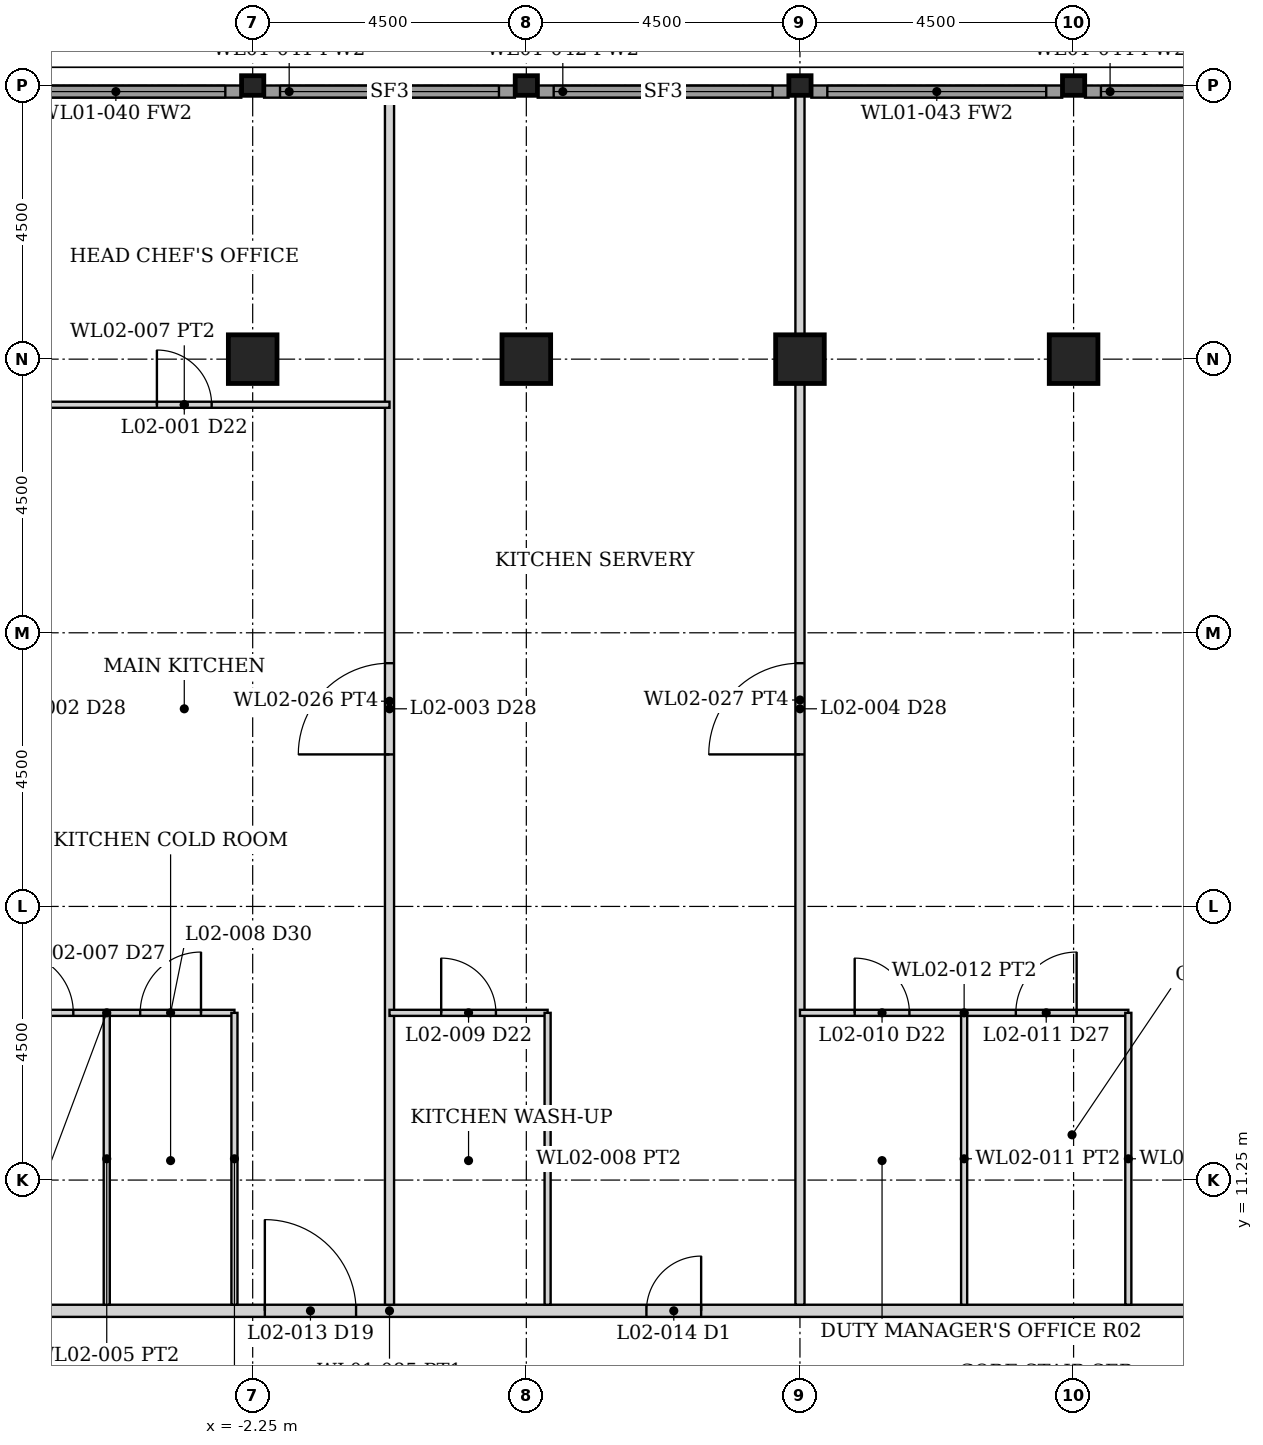
"""IFC4 building model, lengths in metres.
Left out: names, types, materials, properties, quantities, classifications, styles, units other than length and angle.
Written with IfcOpenShell. Run it as: python <this file> out.ifc"""

import sys

from ifc_helpers import new_model, si_unit, direction, frame, frame_2d, origin, origin_2d, place, context, subcontext, project, spatial, rectangle, hollow_rectangle, i_section, extrude, element, fill, save


model = new_model("IFC4")
c1 = context("Model", 3, precision=1e-05, world=origin(), true_north=direction((0.0, 1.0)))
c2 = subcontext(c1, "Body", "Model", "MODEL_VIEW")
j1 = project(units=[si_unit("LENGTHUNIT", "METRE"), si_unit("PLANEANGLEUNIT", "RADIAN")], contexts=[c1])
p1 = place(None, origin())
s1 = spatial("IfcSite", under=j1, at=p1, CompositionType="ELEMENT")
p2 = place(p1, origin())
s2 = spatial("IfcBuilding", under=s1, at=p2, CompositionType="ELEMENT")
p3 = place(p2, frame((0.0, 0.0, 11.0)))
s3 = spatial("IfcBuildingStorey", under=s2, at=p3, CompositionType="ELEMENT", Elevation=11.0)
for number, where, z_axis, x_axis in (
    (1, (-2.25, 24.75, 0.0), (0.0, 0.0, 1.0), (0.0, 1.0, 0.0)),
    (2, (2.25, 24.75, 0.0), (0.0, 0.0, 1.0), (0.0, 1.0, 0.0)),
    (3, (6.75, 24.75, 0.0), (0.0, 0.0, 1.0), (0.0, 1.0, 0.0)),
    (4, (11.25, 24.75, 0.0), (0.0, 0.0, 1.0), (0.0, 1.0, 0.0)),
):
    element("IfcColumn", number, at=place(p3, frame(where, z_axis=z_axis, x_axis=x_axis)), inside=s3, PredefinedType="COLUMN", context=c2, shape_type="SweptSolid", body=[
        extrude(hollow_rectangle(XDim=0.8, YDim=0.8, WallThickness=0.08, at=origin_2d()), origin(), (0.0, 0.0, 1.0), 5.0),
    ])
for number, where, z_axis, x_axis in (
    (5, (-2.25, 29.25, 0.0), (0.0, 0.0, 1.0), (0.0, 1.0, 0.0)),
    (6, (2.25, 29.25, 0.0), (0.0, 0.0, 1.0), (0.0, 1.0, 0.0)),
    (7, (6.75, 29.25, 0.0), (0.0, 0.0, 1.0), (0.0, 1.0, 0.0)),
    (8, (11.25, 29.25, 0.0), (0.0, 0.0, 1.0), (0.0, 1.0, 0.0)),
):
    element("IfcColumn", number, at=place(p3, frame(where, z_axis=z_axis, x_axis=x_axis)), inside=s3, PredefinedType="COLUMN", context=c2, shape_type="SweptSolid", body=[
        extrude(i_section(OverallWidth=0.322, OverallDepth=0.365, WebThickness=0.027, FlangeThickness=0.044, FilletRadius=0.015, at=origin_2d()), origin(), (0.0, 0.0, 1.0), 5.0),
    ])
p4 = place(p3, frame((-6.562, 29.15, 0.0), z_axis=(0.0, 0.0, 1.0), x_axis=(1.0, 0.0, 0.0)))
e9 = element("IfcWall", 9, at=p4, inside=s3, PredefinedType="SOLIDWALL", context=c2, shape_type="SweptSolid", body=[
    extrude(rectangle(XDim=4.125, YDim=0.2, at=frame_2d((2.062, 0.0))), origin(), (0.0, 0.0, 1.0), 4.133),
])
p5 = place(p4, frame((0.262, 0.0, 0.15)))
e10 = element("IfcOpeningElement", 10, at=p5, cuts=e9, PredefinedType="OPENING", context=c2, shape_type="SweptSolid", body=[
    extrude(rectangle(XDim=3.6, YDim=3.833, at=frame_2d((1.8, 1.917))), frame((0.0, 0.11, 0.0), z_axis=(0.0, -1.0, 0.0), x_axis=(1.0, 0.0, 0.0)), (0.0, 0.0, 1.0), 0.22),
])
p6 = place(p3, frame((-2.062, 29.15, 0.0), z_axis=(0.0, 0.0, 1.0), x_axis=(1.0, 0.0, 0.0)))
e11 = element("IfcWall", 11, at=p6, inside=s3, PredefinedType="SOLIDWALL", context=c2, shape_type="SweptSolid", body=[
    extrude(rectangle(XDim=4.125, YDim=0.2, at=frame_2d((2.062, 0.0))), origin(), (0.0, 0.0, 1.0), 4.133),
])
p7 = place(p6, frame((0.262, 0.0, 0.15)))
e12 = element("IfcOpeningElement", 12, at=p7, cuts=e11, PredefinedType="OPENING", context=c2, shape_type="SweptSolid", body=[
    extrude(rectangle(XDim=3.6, YDim=3.833, at=frame_2d((1.8, 1.917))), frame((0.0, 0.11, 0.0), z_axis=(0.0, -1.0, 0.0), x_axis=(1.0, 0.0, 0.0)), (0.0, 0.0, 1.0), 0.22),
])
p8 = place(p3, frame((2.438, 29.15, 0.0), z_axis=(0.0, 0.0, 1.0), x_axis=(1.0, 0.0, 0.0)))
e13 = element("IfcWall", 13, at=p8, inside=s3, PredefinedType="SOLIDWALL", context=c2, shape_type="SweptSolid", body=[
    extrude(rectangle(XDim=4.125, YDim=0.2, at=frame_2d((2.062, 0.0))), origin(), (0.0, 0.0, 1.0), 4.133),
])
p9 = place(p8, frame((0.262, 0.0, 0.15)))
e14 = element("IfcOpeningElement", 14, at=p9, cuts=e13, PredefinedType="OPENING", context=c2, shape_type="SweptSolid", body=[
    extrude(rectangle(XDim=3.6, YDim=3.833, at=frame_2d((1.8, 1.917))), frame((0.0, 0.11, 0.0), z_axis=(0.0, -1.0, 0.0), x_axis=(1.0, 0.0, 0.0)), (0.0, 0.0, 1.0), 0.22),
])
p10 = place(p3, frame((6.938, 29.15, 0.0), z_axis=(0.0, 0.0, 1.0), x_axis=(1.0, 0.0, 0.0)))
e15 = element("IfcWall", 15, at=p10, inside=s3, PredefinedType="SOLIDWALL", context=c2, shape_type="SweptSolid", body=[
    extrude(rectangle(XDim=4.125, YDim=0.2, at=frame_2d((2.062, 0.0))), origin(), (0.0, 0.0, 1.0), 4.133),
])
p11 = place(p10, frame((0.262, 0.0, 0.15)))
e16 = element("IfcOpeningElement", 16, at=p11, cuts=e15, PredefinedType="OPENING", context=c2, shape_type="SweptSolid", body=[
    extrude(rectangle(XDim=3.6, YDim=3.833, at=frame_2d((1.8, 1.917))), frame((0.0, 0.11, 0.0), z_axis=(0.0, -1.0, 0.0), x_axis=(1.0, 0.0, 0.0)), (0.0, 0.0, 1.0), 0.22),
])
p12 = place(p3, frame((11.438, 29.15, 0.0), z_axis=(0.0, 0.0, 1.0), x_axis=(1.0, 0.0, 0.0)))
e17 = element("IfcWall", 17, at=p12, inside=s3, PredefinedType="SOLIDWALL", context=c2, shape_type="SweptSolid", body=[
    extrude(rectangle(XDim=4.125, YDim=0.2, at=frame_2d((2.062, 0.0))), origin(), (0.0, 0.0, 1.0), 4.133),
])
p13 = place(p12, frame((0.262, 0.0, 0.15)))
e18 = element("IfcOpeningElement", 18, at=p13, cuts=e17, PredefinedType="OPENING", context=c2, shape_type="SweptSolid", body=[
    extrude(rectangle(XDim=3.6, YDim=3.833, at=frame_2d((1.8, 1.917))), frame((0.0, 0.11, 0.0), z_axis=(0.0, -1.0, 0.0), x_axis=(1.0, 0.0, 0.0)), (0.0, 0.0, 1.0), 0.22),
])
p14 = place(p3, frame((-25.075, 9.1, 0.0), z_axis=(0.0, 0.0, 1.0), x_axis=(1.0, 0.0, 0.0)))
e19 = element("IfcWall", 19, at=p14, inside=s3, PredefinedType="PARTITIONING", context=c2, shape_type="SweptSolid", body=[
    extrude(rectangle(XDim=50.15, YDim=0.2, at=frame_2d((25.075, 0.0))), origin(), (0.0, 0.0, 1.0), 3.829),
])
p15 = place(p14, frame((6.4, 0.0, 0.0)))
e20 = element("IfcOpeningElement", 20, at=p15, cuts=e19, PredefinedType="OPENING", context=c2, shape_type="SweptSolid", body=[
    extrude(rectangle(XDim=1.8, YDim=2.1, at=frame_2d((0.9, 1.05))), frame((0.0, 0.11, 0.0), z_axis=(0.0, -1.0, 0.0), x_axis=(1.0, 0.0, 0.0)), (0.0, 0.0, 1.0), 0.22),
])
p16 = place(p14, frame((23.025, 0.0, 0.0)))
e21 = element("IfcOpeningElement", 21, at=p16, cuts=e19, PredefinedType="OPENING", context=c2, shape_type="SweptSolid", body=[
    extrude(rectangle(XDim=1.5, YDim=2.1, at=frame_2d((0.75, 1.05))), frame((0.0, 0.11, 0.0), z_axis=(0.0, -1.0, 0.0), x_axis=(1.0, 0.0, 0.0)), (0.0, 0.0, 1.0), 0.22),
])
p17 = place(p14, frame((29.3, 0.0, 0.0)))
e22 = element("IfcOpeningElement", 22, at=p17, cuts=e19, PredefinedType="OPENING", context=c2, shape_type="SweptSolid", body=[
    extrude(rectangle(XDim=0.9, YDim=2.1, at=frame_2d((0.45, 1.05))), frame((0.0, 0.11, 0.0), z_axis=(0.0, -1.0, 0.0), x_axis=(1.0, 0.0, 0.0)), (0.0, 0.0, 1.0), 0.22),
])
p18 = place(p14, frame((41.95, 0.0, 0.0)))
e23 = element("IfcOpeningElement", 23, at=p18, cuts=e19, PredefinedType="OPENING", context=c2, shape_type="SweptSolid", body=[
    extrude(rectangle(XDim=1.8, YDim=2.1, at=frame_2d((0.9, 1.05))), frame((0.0, 0.11, 0.0), z_axis=(0.0, -1.0, 0.0), x_axis=(1.0, 0.0, 0.0)), (0.0, 0.0, 1.0), 0.22),
])
p19 = place(p3, frame((0.0, 9.2, 0.0), z_axis=(0.0, 0.0, 1.0), x_axis=(0.0, 1.0, 0.0)))
e24 = element("IfcWall", 24, at=p19, inside=s3, PredefinedType="PARTITIONING", context=c2, shape_type="SweptSolid", body=[
    extrude(rectangle(XDim=19.85, YDim=0.15, at=frame_2d((9.925, 0.0))), origin(), (0.0, 0.0, 1.0), 3.829),
])
p20 = place(p19, frame((9.05, 0.0, 0.0)))
e25 = element("IfcOpeningElement", 25, at=p20, cuts=e24, PredefinedType="OPENING", context=c2, shape_type="SweptSolid", body=[
    extrude(rectangle(XDim=1.5, YDim=2.1, at=frame_2d((0.75, 1.05))), frame((0.0, 0.085, 0.0), z_axis=(0.0, -1.0, 0.0), x_axis=(1.0, 0.0, 0.0)), (0.0, 0.0, 1.0), 0.17),
])
p21 = place(p3, frame((6.75, 9.2, 0.0), z_axis=(0.0, 0.0, 1.0), x_axis=(0.0, 1.0, 0.0)))
e26 = element("IfcWall", 26, at=p21, inside=s3, PredefinedType="PARTITIONING", context=c2, shape_type="SweptSolid", body=[
    extrude(rectangle(XDim=19.889, YDim=0.15, at=frame_2d((9.944, 0.0))), origin(), (0.0, 0.0, 1.0), 3.829),
])
p22 = place(p21, frame((9.05, 0.0, 0.0)))
e27 = element("IfcOpeningElement", 27, at=p22, cuts=e26, PredefinedType="OPENING", context=c2, shape_type="SweptSolid", body=[
    extrude(rectangle(XDim=1.5, YDim=2.1, at=frame_2d((0.75, 1.05))), frame((0.0, 0.085, 0.0), z_axis=(0.0, -1.0, 0.0), x_axis=(1.0, 0.0, 0.0)), (0.0, 0.0, 1.0), 0.17),
])
p23 = place(p3, frame((-6.75, 14.0, 0.0), z_axis=(0.0, 0.0, 1.0), x_axis=(1.0, 0.0, 0.0)))
e28 = element("IfcWall", 28, at=p23, inside=s3, PredefinedType="PARTITIONING", context=c2, shape_type="SweptSolid", body=[
    extrude(rectangle(XDim=4.2, YDim=0.1, at=frame_2d((2.1, 0.0))), origin(), (0.0, 0.0, 1.0), 3.829),
])
p24 = place(p23, frame((0.55, 0.0, 0.0)))
e29 = element("IfcOpeningElement", 29, at=p24, cuts=e28, PredefinedType="OPENING", context=c2, shape_type="SweptSolid", body=[
    extrude(rectangle(XDim=1.0, YDim=2.1, at=frame_2d((0.5, 1.05))), frame((0.0, 0.06, 0.0), z_axis=(0.0, -1.0, 0.0), x_axis=(1.0, 0.0, 0.0)), (0.0, 0.0, 1.0), 0.12),
])
p25 = place(p23, frame((2.65, 0.0, 0.0)))
e30 = element("IfcOpeningElement", 30, at=p25, cuts=e28, PredefinedType="OPENING", context=c2, shape_type="SweptSolid", body=[
    extrude(rectangle(XDim=1.0, YDim=2.1, at=frame_2d((0.5, 1.05))), frame((0.0, 0.06, 0.0), z_axis=(0.0, -1.0, 0.0), x_axis=(1.0, 0.0, 0.0)), (0.0, 0.0, 1.0), 0.12),
])
for number, where, z_axis, x_axis in (
    (31, (-4.65, 9.2, 0.0), (0.0, 0.0, 1.0), (0.0, 1.0, 0.0)),
    (32, (-2.55, 9.2, 0.0), (0.0, 0.0, 1.0), (0.0, 1.0, 0.0)),
):
    element("IfcWall", number, at=place(p3, frame(where, z_axis=z_axis, x_axis=x_axis)), inside=s3, PredefinedType="PARTITIONING", context=c2, shape_type="SweptSolid", body=[
        extrude(rectangle(XDim=4.8, YDim=0.1, at=frame_2d((2.4, 0.0))), origin(), (0.0, 0.0, 1.0), 3.829),
    ])
p26 = place(p3, frame((-6.75, 24.0, 0.0), z_axis=(0.0, 0.0, 1.0), x_axis=(1.0, 0.0, 0.0)))
e33 = element("IfcWall", 33, at=p26, inside=s3, PredefinedType="PARTITIONING", context=c2, shape_type="SweptSolid", body=[
    extrude(rectangle(XDim=6.75, YDim=0.1, at=frame_2d((3.375, 0.0))), origin(), (0.0, 0.0, 1.0), 3.829),
])
p27 = place(p26, frame((2.925, 0.0, 0.0)))
e34 = element("IfcOpeningElement", 34, at=p27, cuts=e33, PredefinedType="OPENING", context=c2, shape_type="SweptSolid", body=[
    extrude(rectangle(XDim=0.9, YDim=2.1, at=frame_2d((0.45, 1.05))), frame((0.0, 0.06, 0.0), z_axis=(0.0, -1.0, 0.0), x_axis=(1.0, 0.0, 0.0)), (0.0, 0.0, 1.0), 0.12),
])
p28 = place(p3, frame((0.0, 14.0, 0.0), z_axis=(0.0, 0.0, 1.0), x_axis=(1.0, 0.0, 0.0)))
e35 = element("IfcWall", 35, at=p28, inside=s3, PredefinedType="PARTITIONING", context=c2, shape_type="SweptSolid", body=[
    extrude(rectangle(XDim=2.6, YDim=0.1, at=frame_2d((1.3, 0.0))), origin(), (0.0, 0.0, 1.0), 3.829),
])
p29 = place(p28, frame((0.85, 0.0, 0.0)))
e36 = element("IfcOpeningElement", 36, at=p29, cuts=e35, PredefinedType="OPENING", context=c2, shape_type="SweptSolid", body=[
    extrude(rectangle(XDim=0.9, YDim=2.1, at=frame_2d((0.45, 1.05))), frame((0.0, 0.06, 0.0), z_axis=(0.0, -1.0, 0.0), x_axis=(1.0, 0.0, 0.0)), (0.0, 0.0, 1.0), 0.12),
])
p30 = place(p3, frame((2.6, 9.2, 0.0), z_axis=(0.0, 0.0, 1.0), x_axis=(0.0, 1.0, 0.0)))
e37 = element("IfcWall", 37, at=p30, inside=s3, PredefinedType="PARTITIONING", context=c2, shape_type="SweptSolid", body=[
    extrude(rectangle(XDim=4.8, YDim=0.1, at=frame_2d((2.4, 0.0))), origin(), (0.0, 0.0, 1.0), 3.829),
])
p31 = place(p3, frame((6.75, 14.0, 0.0), z_axis=(0.0, 0.0, 1.0), x_axis=(1.0, 0.0, 0.0)))
e38 = element("IfcWall", 38, at=p31, inside=s3, PredefinedType="PARTITIONING", context=c2, shape_type="SweptSolid", body=[
    extrude(rectangle(XDim=5.4, YDim=0.1, at=frame_2d((2.7, 0.0))), origin(), (0.0, 0.0, 1.0), 3.829),
])
p32 = place(p31, frame((3.55, 0.0, 0.0)))
e39 = element("IfcOpeningElement", 39, at=p32, cuts=e38, PredefinedType="OPENING", context=c2, shape_type="SweptSolid", body=[
    extrude(rectangle(XDim=1.0, YDim=2.1, at=frame_2d((0.5, 1.05))), frame((0.0, 0.06, 0.0), z_axis=(0.0, -1.0, 0.0), x_axis=(1.0, 0.0, 0.0)), (0.0, 0.0, 1.0), 0.12),
])
p33 = place(p31, frame((0.9, 0.0, 0.0)))
e40 = element("IfcOpeningElement", 40, at=p33, cuts=e38, PredefinedType="OPENING", context=c2, shape_type="SweptSolid", body=[
    extrude(rectangle(XDim=0.9, YDim=2.1, at=frame_2d((0.45, 1.05))), frame((0.0, 0.06, 0.0), z_axis=(0.0, -1.0, 0.0), x_axis=(1.0, 0.0, 0.0)), (0.0, 0.0, 1.0), 0.12),
])
for number, where, z_axis, x_axis in (
    (41, (9.45, 9.2, 0.0), (0.0, 0.0, 1.0), (0.0, 1.0, 0.0)),
    (42, (12.15, 9.2, 0.0), (0.0, 0.0, 1.0), (0.0, 1.0, 0.0)),
):
    element("IfcWall", number, at=place(p3, frame(where, z_axis=z_axis, x_axis=x_axis)), inside=s3, PredefinedType="PARTITIONING", context=c2, shape_type="SweptSolid", body=[
        extrude(rectangle(XDim=4.8, YDim=0.1, at=frame_2d((2.4, 0.0))), origin(), (0.0, 0.0, 1.0), 3.829),
    ])
p34 = place(p5, origin())
e43 = element("IfcWindow", 43, at=p34, inside=s3, PartitioningType="SINGLE_PANEL", PredefinedType="WINDOW", context=c2, shape_type="SweptSolid", body=[
    extrude(rectangle(XDim=3.6, YDim=3.833, at=frame_2d((1.8, 1.917))), frame((0.0, 0.03, 0.0), z_axis=(0.0, -1.0, 0.0), x_axis=(1.0, 0.0, 0.0)), (0.0, 0.0, 1.0), 0.06),
])
fill(e10, e43)
p35 = place(p7, origin())
e44 = element("IfcWindow", 44, at=p35, inside=s3, PartitioningType="SINGLE_PANEL", PredefinedType="WINDOW", context=c2, shape_type="SweptSolid", body=[
    extrude(rectangle(XDim=3.6, YDim=3.833, at=frame_2d((1.8, 1.917))), frame((0.0, 0.03, 0.0), z_axis=(0.0, -1.0, 0.0), x_axis=(1.0, 0.0, 0.0)), (0.0, 0.0, 1.0), 0.06),
])
fill(e12, e44)
p36 = place(p9, origin())
e45 = element("IfcWindow", 45, at=p36, inside=s3, PartitioningType="SINGLE_PANEL", PredefinedType="WINDOW", context=c2, shape_type="SweptSolid", body=[
    extrude(rectangle(XDim=3.6, YDim=3.833, at=frame_2d((1.8, 1.917))), frame((0.0, 0.03, 0.0), z_axis=(0.0, -1.0, 0.0), x_axis=(1.0, 0.0, 0.0)), (0.0, 0.0, 1.0), 0.06),
])
fill(e14, e45)
p37 = place(p11, origin())
e46 = element("IfcWindow", 46, at=p37, inside=s3, PartitioningType="SINGLE_PANEL", PredefinedType="WINDOW", context=c2, shape_type="SweptSolid", body=[
    extrude(rectangle(XDim=3.6, YDim=3.833, at=frame_2d((1.8, 1.917))), frame((0.0, 0.03, 0.0), z_axis=(0.0, -1.0, 0.0), x_axis=(1.0, 0.0, 0.0)), (0.0, 0.0, 1.0), 0.06),
])
fill(e16, e46)
p38 = place(p13, origin())
e47 = element("IfcWindow", 47, at=p38, inside=s3, PartitioningType="SINGLE_PANEL", PredefinedType="WINDOW", context=c2, shape_type="SweptSolid", body=[
    extrude(rectangle(XDim=3.6, YDim=3.833, at=frame_2d((1.8, 1.917))), frame((0.0, 0.03, 0.0), z_axis=(0.0, -1.0, 0.0), x_axis=(1.0, 0.0, 0.0)), (0.0, 0.0, 1.0), 0.06),
])
fill(e18, e47)
p39 = place(p24, origin())
e48 = element("IfcDoor", 48, at=p39, inside=s3, OperationType="SINGLE_SWING_LEFT", PredefinedType="DOOR", context=c2, shape_type="SweptSolid", body=[
    extrude(rectangle(XDim=1.0, YDim=2.1, at=frame_2d((0.5, 1.05))), frame((0.0, 0.025, 0.0), z_axis=(0.0, -1.0, 0.0), x_axis=(1.0, 0.0, 0.0)), (0.0, 0.0, 1.0), 0.05),
])
fill(e29, e48)
p40 = place(p25, origin())
e49 = element("IfcDoor", 49, at=p40, inside=s3, OperationType="SINGLE_SWING_RIGHT", PredefinedType="DOOR", context=c2, shape_type="SweptSolid", body=[
    extrude(rectangle(XDim=1.0, YDim=2.1, at=frame_2d((0.5, 1.05))), frame((0.0, 0.025, 0.0), z_axis=(0.0, -1.0, 0.0), x_axis=(1.0, 0.0, 0.0)), (0.0, 0.0, 1.0), 0.05),
])
fill(e30, e49)
p41 = place(p27, origin())
e50 = element("IfcDoor", 50, at=p41, inside=s3, OperationType="SINGLE_SWING_LEFT", PredefinedType="DOOR", context=c2, shape_type="SweptSolid", body=[
    extrude(rectangle(XDim=0.9, YDim=2.1, at=frame_2d((0.45, 1.05))), frame((0.0, 0.025, 0.0), z_axis=(0.0, -1.0, 0.0), x_axis=(1.0, 0.0, 0.0)), (0.0, 0.0, 1.0), 0.05),
])
fill(e34, e50)
p42 = place(p16, origin())
e51 = element("IfcDoor", 51, at=p42, inside=s3, OperationType="SINGLE_SWING_LEFT", PredefinedType="DOOR", context=c2, shape_type="SweptSolid", body=[
    extrude(rectangle(XDim=1.5, YDim=2.1, at=frame_2d((0.75, 1.05))), frame((0.0, 0.025, 0.0), z_axis=(0.0, -1.0, 0.0), x_axis=(1.0, 0.0, 0.0)), (0.0, 0.0, 1.0), 0.05),
])
fill(e21, e51)
p43 = place(p29, origin())
e52 = element("IfcDoor", 52, at=p43, inside=s3, OperationType="SINGLE_SWING_LEFT", PredefinedType="DOOR", context=c2, shape_type="SweptSolid", body=[
    extrude(rectangle(XDim=0.9, YDim=2.1, at=frame_2d((0.45, 1.05))), frame((0.0, 0.025, 0.0), z_axis=(0.0, -1.0, 0.0), x_axis=(1.0, 0.0, 0.0)), (0.0, 0.0, 1.0), 0.05),
])
fill(e36, e52)
p44 = place(p17, origin())
e53 = element("IfcDoor", 53, at=p44, inside=s3, OperationType="SINGLE_SWING_RIGHT", PredefinedType="DOOR", context=c2, shape_type="SweptSolid", body=[
    extrude(rectangle(XDim=0.9, YDim=2.1, at=frame_2d((0.45, 1.05))), frame((0.0, 0.025, 0.0), z_axis=(0.0, -1.0, 0.0), x_axis=(1.0, 0.0, 0.0)), (0.0, 0.0, 1.0), 0.05),
])
fill(e22, e53)
p45 = place(p32, origin())
e54 = element("IfcDoor", 54, at=p45, inside=s3, OperationType="SINGLE_SWING_RIGHT", PredefinedType="DOOR", context=c2, shape_type="SweptSolid", body=[
    extrude(rectangle(XDim=1.0, YDim=2.1, at=frame_2d((0.5, 1.05))), frame((0.0, 0.025, 0.0), z_axis=(0.0, -1.0, 0.0), x_axis=(1.0, 0.0, 0.0)), (0.0, 0.0, 1.0), 0.05),
])
fill(e39, e54)
p46 = place(p33, origin())
e55 = element("IfcDoor", 55, at=p46, inside=s3, OperationType="SINGLE_SWING_LEFT", PredefinedType="DOOR", context=c2, shape_type="SweptSolid", body=[
    extrude(rectangle(XDim=0.9, YDim=2.1, at=frame_2d((0.45, 1.05))), frame((0.0, 0.025, 0.0), z_axis=(0.0, -1.0, 0.0), x_axis=(1.0, 0.0, 0.0)), (0.0, 0.0, 1.0), 0.05),
])
fill(e40, e55)
p47 = place(p20, origin())
e56 = element("IfcDoor", 56, at=p47, inside=s3, OperationType="SINGLE_SWING_LEFT", PredefinedType="DOOR", context=c2, shape_type="SweptSolid", body=[
    extrude(rectangle(XDim=1.5, YDim=2.1, at=frame_2d((0.75, 1.05))), frame((0.0, 0.025, 0.0), z_axis=(0.0, -1.0, 0.0), x_axis=(1.0, 0.0, 0.0)), (0.0, 0.0, 1.0), 0.05),
])
fill(e25, e56)
p48 = place(p22, origin())
e57 = element("IfcDoor", 57, at=p48, inside=s3, OperationType="SINGLE_SWING_LEFT", PredefinedType="DOOR", context=c2, shape_type="SweptSolid", body=[
    extrude(rectangle(XDim=1.5, YDim=2.1, at=frame_2d((0.75, 1.05))), frame((0.0, 0.025, 0.0), z_axis=(0.0, -1.0, 0.0), x_axis=(1.0, 0.0, 0.0)), (0.0, 0.0, 1.0), 0.05),
])
fill(e27, e57)
save(model, sys.argv[1])
